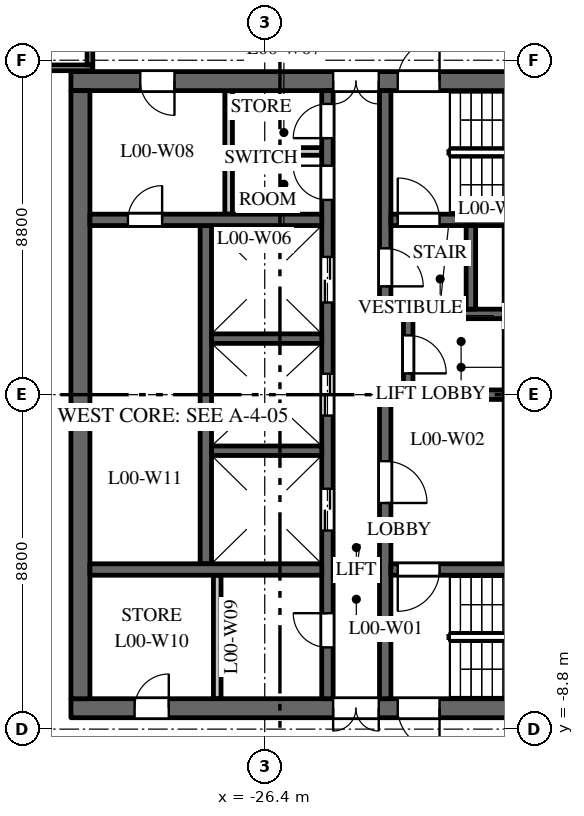
"""IFC4 building model, lengths in metres.
Left out: names, types, materials, properties, quantities, classifications, styles, units other than length and angle.
Written with IfcOpenShell. Run it as: python <this file> out.ifc"""

import sys

from ifc_helpers import new_model, si_unit, direction, frame, frame_2d, origin, place, context, subcontext, project, spatial, rectangle, extrude, element, fill, save


model = new_model("IFC4")
c1 = context("Model", 3, precision=1e-05, world=origin(), true_north=direction((0.0, 1.0)))
c2 = subcontext(c1, "Body", "Model", "MODEL_VIEW")
j1 = project(units=[si_unit("LENGTHUNIT", "METRE"), si_unit("PLANEANGLEUNIT", "RADIAN")], contexts=[c1])
p1 = place(None, origin())
s1 = spatial("IfcSite", under=j1, at=p1, CompositionType="ELEMENT")
p2 = place(p1, origin())
s2 = spatial("IfcBuilding", under=s1, at=p2, CompositionType="ELEMENT")
p3 = place(p2, origin())
s3 = spatial("IfcBuildingStorey", under=s2, at=p3, CompositionType="ELEMENT", Elevation=0.0)
p4 = place(p3, frame((-16.5, 8.25, 0.0), z_axis=(0.0, 0.0, 1.0), x_axis=(-1.0, 0.0, 0.0)))
e1 = element("IfcWall", 1, at=p4, inside=s3, PredefinedType="SHEAR", context=c2, shape_type="SweptSolid", body=[
    extrude(rectangle(XDim=15.0, YDim=0.5, at=frame_2d((7.5, 0.0))), origin(), (0.0, 0.0, 1.0), 7.25),
])
p5 = place(p4, frame((6.9, 0.0, 0.0)))
e2 = element("IfcOpeningElement", 2, at=p5, cuts=e1, PredefinedType="OPENING", context=c2, shape_type="SweptSolid", body=[
    extrude(rectangle(XDim=1.2, YDim=2.1, at=frame_2d((0.6, 1.05))), frame((0.0, 0.26, 0.0), z_axis=(0.0, -1.0, 0.0), x_axis=(1.0, 0.0, 0.0)), (0.0, 0.0, 1.0), 0.52),
])
p6 = place(p4, frame((5.3, 0.0, 0.0)))
e3 = element("IfcOpeningElement", 3, at=p6, cuts=e1, PredefinedType="OPENING", context=c2, shape_type="SweptSolid", body=[
    extrude(rectangle(XDim=1.1, YDim=2.1, at=frame_2d((0.55, 1.05))), frame((0.0, 0.26, 0.0), z_axis=(0.0, -1.0, 0.0), x_axis=(1.0, 0.0, 0.0)), (0.0, 0.0, 1.0), 0.52),
])
p7 = place(p4, frame((12.275, 0.0, 0.0)))
e4 = element("IfcOpeningElement", 4, at=p7, cuts=e1, PredefinedType="OPENING", context=c2, shape_type="SweptSolid", body=[
    extrude(rectangle(XDim=0.9, YDim=2.1, at=frame_2d((0.45, 1.05))), frame((0.0, 0.26, 0.0), z_axis=(0.0, -1.0, 0.0), x_axis=(1.0, 0.0, 0.0)), (0.0, 0.0, 1.0), 0.52),
])
p8 = place(p3, frame((-16.5, -8.25, 0.0), z_axis=(0.0, 0.0, 1.0), x_axis=(-1.0, 0.0, 0.0)))
e5 = element("IfcWall", 5, at=p8, inside=s3, PredefinedType="SHEAR", context=c2, shape_type="SweptSolid", body=[
    extrude(rectangle(XDim=15.0, YDim=0.5, at=frame_2d((7.5, 0.0))), origin(), (0.0, 0.0, 1.0), 7.25),
])
p9 = place(p8, frame((6.9, 0.0, 0.0)))
e6 = element("IfcOpeningElement", 6, at=p9, cuts=e5, PredefinedType="OPENING", context=c2, shape_type="SweptSolid", body=[
    extrude(rectangle(XDim=1.2, YDim=2.1, at=frame_2d((0.6, 1.05))), frame((0.0, 0.26, 0.0), z_axis=(0.0, -1.0, 0.0), x_axis=(1.0, 0.0, 0.0)), (0.0, 0.0, 1.0), 0.52),
])
p10 = place(p8, frame((5.3, 0.0, 0.0)))
e7 = element("IfcOpeningElement", 7, at=p10, cuts=e5, PredefinedType="OPENING", context=c2, shape_type="SweptSolid", body=[
    extrude(rectangle(XDim=1.1, YDim=2.1, at=frame_2d((0.55, 1.05))), frame((0.0, 0.26, 0.0), z_axis=(0.0, -1.0, 0.0), x_axis=(1.0, 0.0, 0.0)), (0.0, 0.0, 1.0), 0.52),
])
p11 = place(p8, frame((12.425, 0.0, 0.0)))
e8 = element("IfcOpeningElement", 8, at=p11, cuts=e5, PredefinedType="OPENING", context=c2, shape_type="SweptSolid", body=[
    extrude(rectangle(XDim=0.9, YDim=2.1, at=frame_2d((0.45, 1.05))), frame((0.0, 0.26, 0.0), z_axis=(0.0, -1.0, 0.0), x_axis=(1.0, 0.0, 0.0)), (0.0, 0.0, 1.0), 0.52),
])
p12 = place(p3, frame((-27.95, -4.45, 0.0), z_axis=(0.0, 0.0, 1.0), x_axis=(0.0, 1.0, 0.0)))
e9 = element("IfcWall", 9, at=p12, inside=s3, PredefinedType="SHEAR", context=c2, shape_type="SweptSolid", body=[
    extrude(rectangle(XDim=8.9, YDim=0.3, at=frame_2d((4.45, 0.0))), origin(), (0.0, 0.0, 1.0), 7.25),
])
p13 = place(p3, frame((-24.75, -8.0, 0.0), z_axis=(0.0, 0.0, 1.0), x_axis=(0.0, 1.0, 0.0)))
e10 = element("IfcWall", 10, at=p13, inside=s3, PredefinedType="SHEAR", context=c2, shape_type="SweptSolid", body=[
    extrude(rectangle(XDim=16.0, YDim=0.3, at=frame_2d((8.0, 0.0))), origin(), (0.0, 0.0, 1.0), 7.25),
])
p14 = place(p13, frame((4.425, 0.0, 0.0)))
e11 = element("IfcOpeningElement", 11, at=p14, cuts=e10, PredefinedType="OPENING", context=c2, shape_type="SweptSolid", body=[
    extrude(rectangle(XDim=1.1, YDim=2.1, at=frame_2d((0.55, 1.05))), frame((0.0, 0.16, 0.0), z_axis=(0.0, -1.0, 0.0), x_axis=(1.0, 0.0, 0.0)), (0.0, 0.0, 1.0), 0.32),
])
p15 = place(p13, frame((7.45, 0.0, 0.0)))
e12 = element("IfcOpeningElement", 12, at=p15, cuts=e10, PredefinedType="OPENING", context=c2, shape_type="SweptSolid", body=[
    extrude(rectangle(XDim=1.1, YDim=2.1, at=frame_2d((0.55, 1.05))), frame((0.0, 0.16, 0.0), z_axis=(0.0, -1.0, 0.0), x_axis=(1.0, 0.0, 0.0)), (0.0, 0.0, 1.0), 0.32),
])
p16 = place(p13, frame((10.425, 0.0, 0.0)))
e13 = element("IfcOpeningElement", 13, at=p16, cuts=e10, PredefinedType="OPENING", context=c2, shape_type="SweptSolid", body=[
    extrude(rectangle(XDim=1.2, YDim=2.1, at=frame_2d((0.6, 1.05))), frame((0.0, 0.16, 0.0), z_axis=(0.0, -1.0, 0.0), x_axis=(1.0, 0.0, 0.0)), (0.0, 0.0, 1.0), 0.32),
])
p17 = place(p13, frame((13.125, 0.0, 0.0)))
e14 = element("IfcOpeningElement", 14, at=p17, cuts=e10, PredefinedType="OPENING", context=c2, shape_type="SweptSolid", body=[
    extrude(rectangle(XDim=0.9, YDim=2.1, at=frame_2d((0.45, 1.05))), frame((0.0, 0.16, 0.0), z_axis=(0.0, -1.0, 0.0), x_axis=(1.0, 0.0, 0.0)), (0.0, 0.0, 1.0), 0.32),
])
p18 = place(p13, frame((14.75, 0.0, 0.0)))
e15 = element("IfcOpeningElement", 15, at=p18, cuts=e10, PredefinedType="OPENING", context=c2, shape_type="SweptSolid", body=[
    extrude(rectangle(XDim=0.9, YDim=2.1, at=frame_2d((0.45, 1.05))), frame((0.0, 0.16, 0.0), z_axis=(0.0, -1.0, 0.0), x_axis=(1.0, 0.0, 0.0)), (0.0, 0.0, 1.0), 0.32),
])
p19 = place(p13, frame((1.35, 0.0, 0.0)))
e16 = element("IfcOpeningElement", 16, at=p19, cuts=e10, PredefinedType="OPENING", context=c2, shape_type="SweptSolid", body=[
    extrude(rectangle(XDim=0.9, YDim=2.1, at=frame_2d((0.45, 1.05))), frame((0.0, 0.16, 0.0), z_axis=(0.0, -1.0, 0.0), x_axis=(1.0, 0.0, 0.0)), (0.0, 0.0, 1.0), 0.32),
])
p20 = place(p3, frame((-20.1, 0.0, 0.0), z_axis=(0.0, 0.0, 1.0), x_axis=(-1.0, 0.0, 0.0)))
e17 = element("IfcWall", 17, at=p20, inside=s3, PredefinedType="SHEAR", context=c2, shape_type="SweptSolid", body=[
    extrude(rectangle(XDim=3.28, YDim=0.25, at=frame_2d((1.64, 0.0))), origin(), (0.0, 0.0, 1.0), 7.25),
])
p21 = place(p3, frame((-22.625, 0.125, 0.0), z_axis=(0.0, 0.0, 1.0), x_axis=(0.0, 1.0, 0.0)))
e18 = element("IfcWall", 18, at=p21, inside=s3, PredefinedType="SHEAR", context=c2, shape_type="SweptSolid", body=[
    extrude(rectangle(XDim=1.875, YDim=0.25, at=frame_2d((0.938, 0.0))), origin(), (0.0, 0.0, 1.0), 7.25),
])
p22 = place(p21, frame((0.435, 0.0, 0.0)))
e19 = element("IfcOpeningElement", 19, at=p22, cuts=e18, PredefinedType="OPENING", context=c2, shape_type="SweptSolid", body=[
    extrude(rectangle(XDim=1.0, YDim=2.1, at=frame_2d((0.5, 1.05))), frame((0.0, 0.135, 0.0), z_axis=(0.0, -1.0, 0.0), x_axis=(1.0, 0.0, 0.0)), (0.0, 0.0, 1.0), 0.27),
])
p23 = place(p3, frame((-31.25, -8.0, 0.0), z_axis=(0.0, 0.0, 1.0), x_axis=(0.0, 1.0, 0.0)))
e20 = element("IfcWall", 20, at=p23, inside=s3, PredefinedType="SHEAR", context=c2, shape_type="SweptSolid", body=[
    extrude(rectangle(XDim=16.0, YDim=0.5, at=frame_2d((8.0, 0.0))), origin(), (0.0, 0.0, 1.0), 7.25),
])
p24 = place(p3, frame((-24.9, 4.6, 0.0), z_axis=(0.0, 0.0, 1.0), x_axis=(-1.0, 0.0, 0.0)))
e21 = element("IfcWall", 21, at=p24, inside=s3, PredefinedType="SHEAR", context=c2, shape_type="SweptSolid", body=[
    extrude(rectangle(XDim=6.1, YDim=0.3, at=frame_2d((3.05, 0.0))), origin(), (0.0, 0.0, 1.0), 7.25),
])
p25 = place(p24, frame((4.2, 0.0, 0.0)))
e22 = element("IfcOpeningElement", 22, at=p25, cuts=e21, PredefinedType="OPENING", context=c2, shape_type="SweptSolid", body=[
    extrude(rectangle(XDim=0.9, YDim=2.1, at=frame_2d((0.45, 1.05))), frame((0.0, 0.16, 0.0), z_axis=(0.0, -1.0, 0.0), x_axis=(1.0, 0.0, 0.0)), (0.0, 0.0, 1.0), 0.32),
])
for number, where, z_axis, x_axis in (
    (23, (-27.35, 4.75, 0.0), (0.0, 0.0, 1.0), (0.0, 1.0, 0.0)),
    (24, (-27.65, -8.0, 0.0), (0.0, 0.0, 1.0), (0.0, 1.0, 0.0)),
):
    element("IfcWall", number, at=place(p3, frame(where, z_axis=z_axis, x_axis=x_axis)), inside=s3, PredefinedType="PARTITIONING", context=c2, shape_type="SweptSolid", body=[
        extrude(rectangle(XDim=3.25, YDim=0.2, at=frame_2d((1.625, 0.0))), origin(), (0.0, 0.0, 1.0), 7.25),
    ])
p26 = place(p3, frame((-24.9, 6.4, 0.0), z_axis=(0.0, 0.0, 1.0), x_axis=(-1.0, 0.0, 0.0)))
e25 = element("IfcWall", 25, at=p26, inside=s3, PredefinedType="PARTITIONING", context=c2, shape_type="SweptSolid", body=[
    extrude(rectangle(XDim=2.35, YDim=0.2, at=frame_2d((1.175, 0.0))), origin(), (0.0, 0.0, 1.0), 7.25),
])
p27 = place(p3, frame((-24.9, -4.6, 0.0), z_axis=(0.0, 0.0, 1.0), x_axis=(-1.0, 0.0, 0.0)))
e26 = element("IfcWall", 26, at=p27, inside=s3, PredefinedType="SHEAR", context=c2, shape_type="SweptSolid", body=[
    extrude(rectangle(XDim=6.1, YDim=0.3, at=frame_2d((3.05, 0.0))), origin(), (0.0, 0.0, 1.0), 7.25),
])
for number, where, z_axis, x_axis in (
    (27, (-24.9, -1.475, 0.0), (0.0, 0.0, 1.0), (-1.0, 0.0, 0.0)),
    (28, (-24.9, 1.475, 0.0), (0.0, 0.0, 1.0), (-1.0, 0.0, 0.0)),
):
    element("IfcWall", number, at=place(p3, frame(where, z_axis=z_axis, x_axis=x_axis)), inside=s3, PredefinedType="SHEAR", context=c2, shape_type="SweptSolid", body=[
        extrude(rectangle(XDim=2.9, YDim=0.25, at=frame_2d((1.45, 0.0))), origin(), (0.0, 0.0, 1.0), 7.25),
    ])
p28 = place(p3, frame((-23.23, 2.25, 0.0), z_axis=(0.0, 0.0, 1.0), x_axis=(0.0, 1.0, 0.0)))
e29 = element("IfcWall", 29, at=p28, inside=s3, PredefinedType="SHEAR", context=c2, shape_type="SweptSolid", body=[
    extrude(rectangle(XDim=5.75, YDim=0.3, at=frame_2d((2.875, 0.0))), origin(), (0.0, 0.0, 1.0), 7.25),
])
p29 = place(p28, frame((0.6, 0.0, 0.0)))
e30 = element("IfcOpeningElement", 30, at=p29, cuts=e29, PredefinedType="OPENING", context=c2, shape_type="SweptSolid", body=[
    extrude(rectangle(XDim=1.0, YDim=2.1, at=frame_2d((0.5, 1.05))), frame((0.0, 0.16, 0.0), z_axis=(0.0, -1.0, 0.0), x_axis=(1.0, 0.0, 0.0)), (0.0, 0.0, 1.0), 0.32),
])
p30 = place(p3, frame((-23.23, -8.0, 0.0), z_axis=(0.0, 0.0, 1.0), x_axis=(0.0, 1.0, 0.0)))
e31 = element("IfcWall", 31, at=p30, inside=s3, PredefinedType="SHEAR", context=c2, shape_type="SweptSolid", body=[
    extrude(rectangle(XDim=7.875, YDim=0.3, at=frame_2d((3.938, 0.0))), origin(), (0.0, 0.0, 1.0), 7.25),
])
p31 = place(p30, frame((5.15, 0.0, 0.0)))
e32 = element("IfcOpeningElement", 32, at=p31, cuts=e31, PredefinedType="OPENING", context=c2, shape_type="SweptSolid", body=[
    extrude(rectangle(XDim=1.1, YDim=2.1, at=frame_2d((0.55, 1.05))), frame((0.0, 0.16, 0.0), z_axis=(0.0, -1.0, 0.0), x_axis=(1.0, 0.0, 0.0)), (0.0, 0.0, 1.0), 0.32),
])
p32 = place(p3, frame((-16.9, 4.6, 0.0), z_axis=(0.0, 0.0, 1.0), x_axis=(-1.0, 0.0, 0.0)))
e33 = element("IfcWall", 33, at=p32, inside=s3, PredefinedType="SHEAR", context=c2, shape_type="SweptSolid", body=[
    extrude(rectangle(XDim=6.18, YDim=0.3, at=frame_2d((3.09, 0.0))), origin(), (0.0, 0.0, 1.0), 7.25),
])
p33 = place(p32, frame((4.9, 0.0, 0.0)))
e34 = element("IfcOpeningElement", 34, at=p33, cuts=e33, PredefinedType="OPENING", context=c2, shape_type="SweptSolid", body=[
    extrude(rectangle(XDim=1.1, YDim=2.1, at=frame_2d((0.55, 1.05))), frame((0.0, 0.16, 0.0), z_axis=(0.0, -1.0, 0.0), x_axis=(1.0, 0.0, 0.0)), (0.0, 0.0, 1.0), 0.32),
])
p34 = place(p3, frame((-16.9, -4.6, 0.0), z_axis=(0.0, 0.0, 1.0), x_axis=(-1.0, 0.0, 0.0)))
e35 = element("IfcWall", 35, at=p34, inside=s3, PredefinedType="SHEAR", context=c2, shape_type="SweptSolid", body=[
    extrude(rectangle(XDim=6.18, YDim=0.3, at=frame_2d((3.09, 0.0))), origin(), (0.0, 0.0, 1.0), 7.25),
])
p35 = place(p34, frame((4.9, 0.0, 0.0)))
e36 = element("IfcOpeningElement", 36, at=p35, cuts=e35, PredefinedType="OPENING", context=c2, shape_type="SweptSolid", body=[
    extrude(rectangle(XDim=1.1, YDim=2.1, at=frame_2d((0.55, 1.05))), frame((0.0, 0.16, 0.0), z_axis=(0.0, -1.0, 0.0), x_axis=(1.0, 0.0, 0.0)), (0.0, 0.0, 1.0), 0.32),
])
p36 = place(p3, frame((-20.1, 2.125, 0.0), z_axis=(0.0, 0.0, 1.0), x_axis=(-1.0, 0.0, 0.0)))
e37 = element("IfcWall", 37, at=p36, inside=s3, PredefinedType="SHEAR", context=c2, shape_type="SweptSolid", body=[
    extrude(rectangle(XDim=3.28, YDim=0.25, at=frame_2d((1.64, 0.0))), origin(), (0.0, 0.0, 1.0), 7.25),
])
p37 = place(p3, frame((-20.975, 2.25, 0.0), z_axis=(0.0, 0.0, 1.0), x_axis=(0.0, 1.0, 0.0)))
e38 = element("IfcWall", 38, at=p37, inside=s3, PredefinedType="SHEAR", context=c2, shape_type="SweptSolid", body=[
    extrude(rectangle(XDim=2.2, YDim=0.25, at=frame_2d((1.1, 0.0))), origin(), (0.0, 0.0, 1.0), 7.25),
])
p38 = place(p3, frame((-30.925, 8.6, 0.0), z_axis=(0.0, 0.0, 1.0), x_axis=(-1.0, 0.0, 0.0)))
e39 = element("IfcWall", 39, at=p38, inside=s3, PredefinedType="PARTITIONING", context=c2, shape_type="SweptSolid", body=[
    extrude(rectangle(XDim=8.025, YDim=0.15, at=frame_2d((4.012, 0.0))), origin(), (0.0, 0.0, 1.0), 6.35),
])
p39 = place(p38, frame((4.012, 0.0, 0.0)))
e40 = element("IfcOpeningElement", 40, at=p39, cuts=e39, PredefinedType="OPENING", context=c2, shape_type="SweptSolid", body=[
    extrude(rectangle(XDim=1.0, YDim=2.1, at=frame_2d((0.5, 1.05))), frame((0.0, 0.085, 0.0), z_axis=(0.0, -1.0, 0.0), x_axis=(1.0, 0.0, 0.0)), (0.0, 0.0, 1.0), 0.17),
])
p40 = place(p3, frame((-31.0, 11.925, 0.0), z_axis=(0.0, 0.0, 1.0), x_axis=(0.0, -1.0, 0.0)))
e41 = element("IfcWall", 41, at=p40, inside=s3, PredefinedType="PARTITIONING", context=c2, shape_type="SweptSolid", body=[
    extrude(rectangle(XDim=3.25, YDim=0.15, at=frame_2d((1.625, 0.0))), origin(), (0.0, 0.0, 1.0), 7.25),
])
p41 = place(p14, origin())
e42 = element("IfcDoor", 42, at=p41, inside=s3, OperationType="DOUBLE_DOOR_SLIDING", PredefinedType="DOOR", context=c2, shape_type="SweptSolid", body=[
    extrude(rectangle(XDim=1.1, YDim=2.1, at=frame_2d((0.55, 1.05))), frame((0.0, 0.025, 0.0), z_axis=(0.0, -1.0, 0.0), x_axis=(1.0, 0.0, 0.0)), (0.0, 0.0, 1.0), 0.05),
])
fill(e11, e42)
p42 = place(p15, origin())
e43 = element("IfcDoor", 43, at=p42, inside=s3, OperationType="DOUBLE_DOOR_SLIDING", PredefinedType="DOOR", context=c2, shape_type="SweptSolid", body=[
    extrude(rectangle(XDim=1.1, YDim=2.1, at=frame_2d((0.55, 1.05))), frame((0.0, 0.025, 0.0), z_axis=(0.0, -1.0, 0.0), x_axis=(1.0, 0.0, 0.0)), (0.0, 0.0, 1.0), 0.05),
])
fill(e12, e43)
p43 = place(p16, origin())
e44 = element("IfcDoor", 44, at=p43, inside=s3, OperationType="DOUBLE_DOOR_SLIDING", PredefinedType="DOOR", context=c2, shape_type="SweptSolid", body=[
    extrude(rectangle(XDim=1.2, YDim=2.1, at=frame_2d((0.6, 1.05))), frame((0.0, 0.025, 0.0), z_axis=(0.0, -1.0, 0.0), x_axis=(1.0, 0.0, 0.0)), (0.0, 0.0, 1.0), 0.05),
])
fill(e13, e44)
p44 = place(p33, origin())
e45 = element("IfcDoor", 45, at=p44, inside=s3, OperationType="SINGLE_SWING_RIGHT", PredefinedType="DOOR", context=c2, shape_type="SweptSolid", body=[
    extrude(rectangle(XDim=1.1, YDim=2.1, at=frame_2d((0.55, 1.05))), frame((0.0, 0.025, 0.0), z_axis=(0.0, -1.0, 0.0), x_axis=(1.0, 0.0, 0.0)), (0.0, 0.0, 1.0), 0.05),
])
fill(e34, e45)
p45 = place(p35, origin())
e46 = element("IfcDoor", 46, at=p45, inside=s3, OperationType="SINGLE_SWING_LEFT", PredefinedType="DOOR", context=c2, shape_type="SweptSolid", body=[
    extrude(rectangle(XDim=1.1, YDim=2.1, at=frame_2d((0.55, 1.05))), frame((0.0, 0.025, 0.0), z_axis=(0.0, -1.0, 0.0), x_axis=(1.0, 0.0, 0.0)), (0.0, 0.0, 1.0), 0.05),
])
fill(e36, e46)
p46 = place(p31, origin())
e47 = element("IfcDoor", 47, at=p46, inside=s3, OperationType="SINGLE_SWING_LEFT", PredefinedType="DOOR", context=c2, shape_type="SweptSolid", body=[
    extrude(rectangle(XDim=1.1, YDim=2.1, at=frame_2d((0.55, 1.05))), frame((0.0, 0.025, 0.0), z_axis=(0.0, -1.0, 0.0), x_axis=(1.0, 0.0, 0.0)), (0.0, 0.0, 1.0), 0.05),
])
fill(e32, e47)
p47 = place(p29, origin())
e48 = element("IfcDoor", 48, at=p47, inside=s3, OperationType="SINGLE_SWING_LEFT", PredefinedType="DOOR", context=c2, shape_type="SweptSolid", body=[
    extrude(rectangle(XDim=1.0, YDim=2.1, at=frame_2d((0.5, 1.05))), frame((0.0, 0.025, 0.0), z_axis=(0.0, -1.0, 0.0), x_axis=(1.0, 0.0, 0.0)), (0.0, 0.0, 1.0), 0.05),
])
fill(e30, e48)
p48 = place(p22, origin())
e49 = element("IfcDoor", 49, at=p48, inside=s3, OperationType="SINGLE_SWING_LEFT", PredefinedType="DOOR", context=c2, shape_type="SweptSolid", body=[
    extrude(rectangle(XDim=1.0, YDim=2.1, at=frame_2d((0.5, 1.05))), frame((0.0, 0.025, 0.0), z_axis=(0.0, -1.0, 0.0), x_axis=(1.0, 0.0, 0.0)), (0.0, 0.0, 1.0), 0.05),
])
fill(e19, e49)
p49 = place(p5, origin())
e50 = element("IfcDoor", 50, at=p49, inside=s3, OperationType="DOUBLE_DOOR_DOUBLE_SWING", PredefinedType="DOOR", context=c2, shape_type="SweptSolid", body=[
    extrude(rectangle(XDim=1.2, YDim=2.1, at=frame_2d((0.6, 1.05))), frame((0.0, 0.025, 0.0), z_axis=(0.0, -1.0, 0.0), x_axis=(1.0, 0.0, 0.0)), (0.0, 0.0, 1.0), 0.05),
])
fill(e2, e50)
p50 = place(p9, origin())
e51 = element("IfcDoor", 51, at=p50, inside=s3, OperationType="DOUBLE_DOOR_DOUBLE_SWING", PredefinedType="DOOR", context=c2, shape_type="SweptSolid", body=[
    extrude(rectangle(XDim=1.2, YDim=2.1, at=frame_2d((0.6, 1.05))), frame((0.0, 0.025, 0.0), z_axis=(0.0, -1.0, 0.0), x_axis=(1.0, 0.0, 0.0)), (0.0, 0.0, 1.0), 0.05),
])
fill(e6, e51)
p51 = place(p6, origin())
e52 = element("IfcDoor", 52, at=p51, inside=s3, OperationType="SINGLE_SWING_LEFT", PredefinedType="DOOR", context=c2, shape_type="SweptSolid", body=[
    extrude(rectangle(XDim=1.1, YDim=2.1, at=frame_2d((0.55, 1.05))), frame((0.0, 0.025, 0.0), z_axis=(0.0, -1.0, 0.0), x_axis=(1.0, 0.0, 0.0)), (0.0, 0.0, 1.0), 0.05),
])
fill(e3, e52)
p52 = place(p10, origin())
e53 = element("IfcDoor", 53, at=p52, inside=s3, OperationType="SINGLE_SWING_RIGHT", PredefinedType="DOOR", context=c2, shape_type="SweptSolid", body=[
    extrude(rectangle(XDim=1.1, YDim=2.1, at=frame_2d((0.55, 1.05))), frame((0.0, 0.025, 0.0), z_axis=(0.0, -1.0, 0.0), x_axis=(1.0, 0.0, 0.0)), (0.0, 0.0, 1.0), 0.05),
])
fill(e7, e53)
p53 = place(p17, origin())
e54 = element("IfcDoor", 54, at=p53, inside=s3, OperationType="SINGLE_SWING_LEFT", PredefinedType="DOOR", context=c2, shape_type="SweptSolid", body=[
    extrude(rectangle(XDim=0.9, YDim=2.1, at=frame_2d((0.45, 1.05))), frame((0.0, 0.025, 0.0), z_axis=(0.0, -1.0, 0.0), x_axis=(1.0, 0.0, 0.0)), (0.0, 0.0, 1.0), 0.05),
])
fill(e14, e54)
p54 = place(p18, origin())
e55 = element("IfcDoor", 55, at=p54, inside=s3, OperationType="SINGLE_SWING_RIGHT", PredefinedType="DOOR", context=c2, shape_type="SweptSolid", body=[
    extrude(rectangle(XDim=0.9, YDim=2.1, at=frame_2d((0.45, 1.05))), frame((0.0, 0.025, 0.0), z_axis=(0.0, -1.0, 0.0), x_axis=(1.0, 0.0, 0.0)), (0.0, 0.0, 1.0), 0.05),
])
fill(e15, e55)
p55 = place(p7, origin())
e56 = element("IfcDoor", 56, at=p55, inside=s3, OperationType="SINGLE_SWING_RIGHT", PredefinedType="DOOR", context=c2, shape_type="SweptSolid", body=[
    extrude(rectangle(XDim=0.9, YDim=2.1, at=frame_2d((0.45, 1.05))), frame((0.0, 0.025, 0.0), z_axis=(0.0, -1.0, 0.0), x_axis=(1.0, 0.0, 0.0)), (0.0, 0.0, 1.0), 0.05),
])
fill(e4, e56)
p56 = place(p19, origin())
e57 = element("IfcDoor", 57, at=p56, inside=s3, OperationType="SINGLE_SWING_LEFT", PredefinedType="DOOR", context=c2, shape_type="SweptSolid", body=[
    extrude(rectangle(XDim=0.9, YDim=2.1, at=frame_2d((0.45, 1.05))), frame((0.0, 0.025, 0.0), z_axis=(0.0, -1.0, 0.0), x_axis=(1.0, 0.0, 0.0)), (0.0, 0.0, 1.0), 0.05),
])
fill(e16, e57)
p57 = place(p11, origin())
e58 = element("IfcDoor", 58, at=p57, inside=s3, OperationType="SINGLE_SWING_LEFT", PredefinedType="DOOR", context=c2, shape_type="SweptSolid", body=[
    extrude(rectangle(XDim=0.9, YDim=2.1, at=frame_2d((0.45, 1.05))), frame((0.0, 0.025, 0.0), z_axis=(0.0, -1.0, 0.0), x_axis=(1.0, 0.0, 0.0)), (0.0, 0.0, 1.0), 0.05),
])
fill(e8, e58)
p58 = place(p25, origin())
e59 = element("IfcDoor", 59, at=p58, inside=s3, OperationType="SINGLE_SWING_LEFT", PredefinedType="DOOR", context=c2, shape_type="SweptSolid", body=[
    extrude(rectangle(XDim=0.9, YDim=2.1, at=frame_2d((0.45, 1.05))), frame((0.0, 0.025, 0.0), z_axis=(0.0, -1.0, 0.0), x_axis=(1.0, 0.0, 0.0)), (0.0, 0.0, 1.0), 0.05),
])
fill(e22, e59)
save(model, sys.argv[1])
